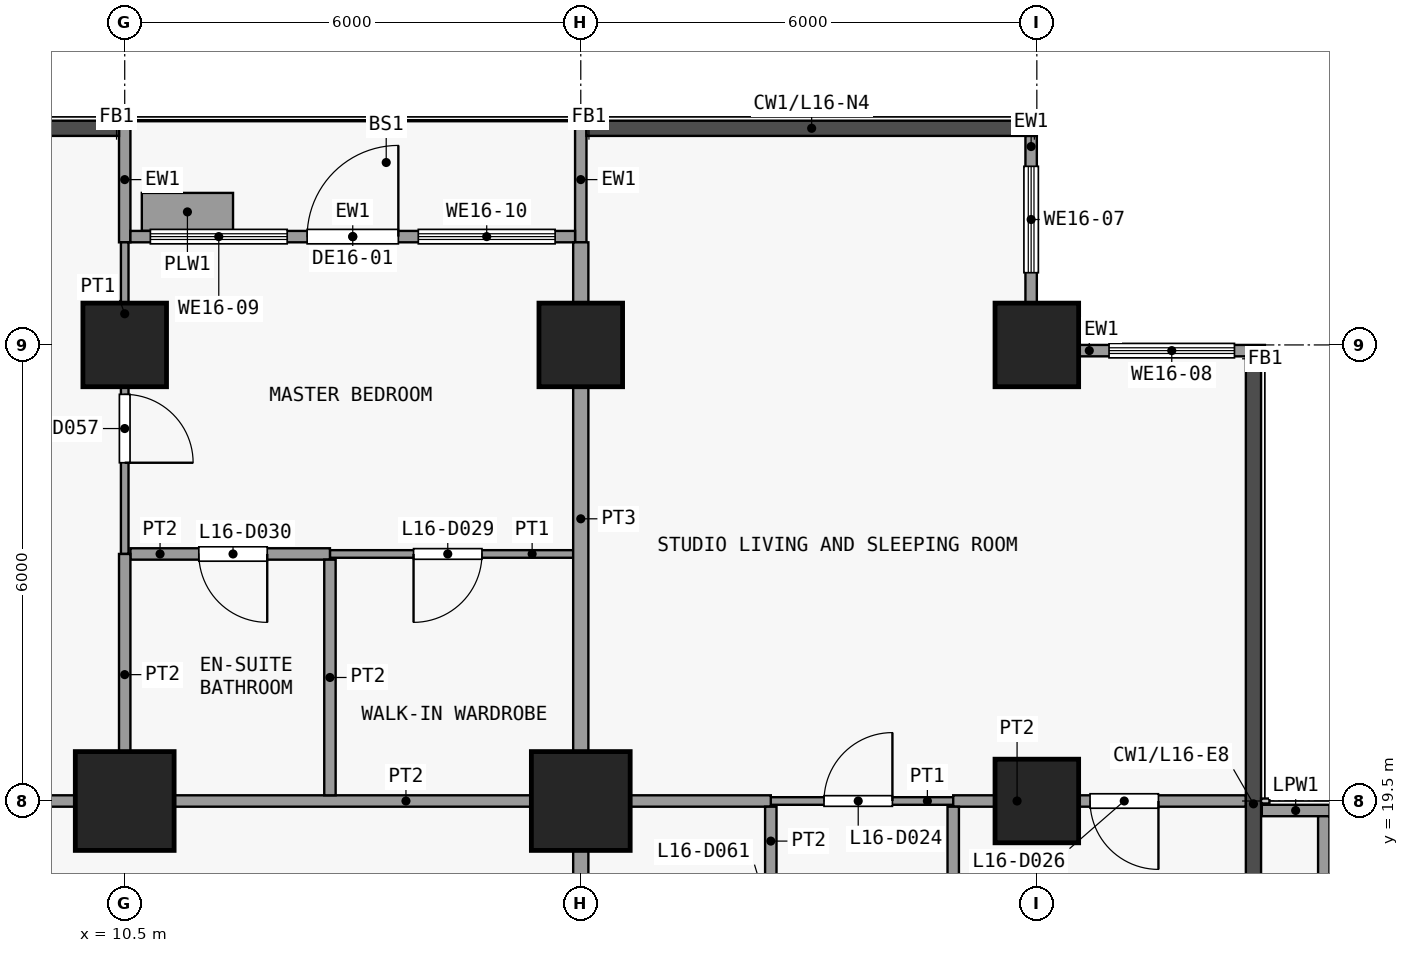
"""IFC4 building model, lengths in metres.
Left out: names, types, materials, properties, quantities, classifications, styles, units other than length and angle.
Written with IfcOpenShell. Run it as: python <this file> out.ifc"""

import sys

from ifc_helpers import new_model, si_unit, direction, frame, frame_2d, origin, origin_2d, place, context, subcontext, project, spatial, rectangle, extrude, element, fill, save


model = new_model("IFC4")
c1 = context("Model", 3, precision=1e-05, world=origin(), true_north=direction((0.0, 1.0)))
c2 = subcontext(c1, "Body", "Model", "MODEL_VIEW")
j1 = project(units=[si_unit("LENGTHUNIT", "METRE"), si_unit("PLANEANGLEUNIT", "RADIAN")], contexts=[c1])
p1 = place(None, origin())
s1 = spatial("IfcSite", under=j1, at=p1, CompositionType="ELEMENT")
p2 = place(p1, origin())
s2 = spatial("IfcBuilding", under=s1, at=p2, CompositionType="ELEMENT")
p3 = place(p2, frame((0.0, 0.0, 68.5)))
s3 = spatial("IfcBuildingStorey", under=s2, at=p3, CompositionType="ELEMENT", Elevation=68.5)
p4 = place(p3, frame((10.5, 19.5, 0.0), z_axis=(0.0, 0.0, 1.0), x_axis=(1.0, 0.0, 0.0)))
e1 = element("IfcColumn", 1, at=p4, inside=s3, PredefinedType="COLUMN", context=c2, shape_type="SweptSolid", body=[
    extrude(rectangle(XDim=1.3, YDim=1.3, at=origin_2d()), origin(), (0.0, 0.0, 1.0), 3.6),
])
p5 = place(p3, frame((10.5, 25.5, 0.0), z_axis=(0.0, 0.0, 1.0), x_axis=(1.0, 0.0, 0.0)))
e2 = element("IfcColumn", 2, at=p5, inside=s3, PredefinedType="COLUMN", context=c2, shape_type="SweptSolid", body=[
    extrude(rectangle(XDim=1.1, YDim=1.1, at=origin_2d()), origin(), (0.0, 0.0, 1.0), 3.6),
])
p6 = place(p3, frame((16.5, 19.5, 0.0), z_axis=(0.0, 0.0, 1.0), x_axis=(1.0, 0.0, 0.0)))
e3 = element("IfcColumn", 3, at=p6, inside=s3, PredefinedType="COLUMN", context=c2, shape_type="SweptSolid", body=[
    extrude(rectangle(XDim=1.3, YDim=1.3, at=origin_2d()), origin(), (0.0, 0.0, 1.0), 3.6),
])
for number, where, z_axis, x_axis in (
    (4, (16.5, 25.5, 0.0), (0.0, 0.0, 1.0), (1.0, 0.0, 0.0)),
    (5, (22.5, 19.5, 0.0), (0.0, 0.0, 1.0), (1.0, 0.0, 0.0)),
    (6, (22.5, 25.5, 0.0), (0.0, 0.0, 1.0), (1.0, 0.0, 0.0)),
):
    element("IfcColumn", number, at=place(p3, frame(where, z_axis=z_axis, x_axis=x_axis)), inside=s3, PredefinedType="COLUMN", context=c2, shape_type="SweptSolid", body=[
        extrude(rectangle(XDim=1.1, YDim=1.1, at=origin_2d()), origin(), (0.0, 0.0, 1.0), 3.6),
    ])
p7 = place(p3, frame((22.425, 28.25, 0.0), z_axis=(0.0, 0.0, 1.0), x_axis=(0.0, -1.0, 0.0)))
e7 = element("IfcWall", 7, at=p7, inside=s3, PredefinedType="SOLIDWALL", context=c2, shape_type="SweptSolid", body=[
    extrude(rectangle(XDim=2.2, YDim=0.15, at=frame_2d((1.1, 0.0))), origin(), (0.0, 0.0, 1.0), 3.3),
])
p8 = place(p7, frame((0.4, 0.0, 0.9)))
e8 = element("IfcOpeningElement", 8, at=p8, cuts=e7, PredefinedType="OPENING", context=c2, shape_type="SweptSolid", body=[
    extrude(rectangle(XDim=1.4, YDim=2.4, at=frame_2d((0.7, 1.2))), frame((0.0, 0.085, 0.0), z_axis=(0.0, -1.0, 0.0), x_axis=(1.0, 0.0, 0.0)), (0.0, 0.0, 1.0), 0.17),
])
p9 = place(p3, frame((23.05, 25.425, 0.0), z_axis=(0.0, 0.0, 1.0), x_axis=(1.0, 0.0, 0.0)))
e9 = element("IfcWall", 9, at=p9, inside=s3, PredefinedType="SOLIDWALL", context=c2, shape_type="SweptSolid", body=[
    extrude(rectangle(XDim=2.45, YDim=0.15, at=frame_2d((1.225, 0.0))), origin(), (0.0, 0.0, 1.0), 3.3),
])
p10 = place(p9, frame((0.4, 0.0, 0.9)))
e10 = element("IfcOpeningElement", 10, at=p10, cuts=e9, PredefinedType="OPENING", context=c2, shape_type="SweptSolid", body=[
    extrude(rectangle(XDim=1.65, YDim=2.4, at=frame_2d((0.825, 1.2))), frame((0.0, 0.085, 0.0), z_axis=(0.0, -1.0, 0.0), x_axis=(1.0, 0.0, 0.0)), (0.0, 0.0, 1.0), 0.17),
])
for number, where, z_axis, x_axis in (
    (11, (10.5, 26.85, 0.0), (0.0, 0.0, 1.0), (0.0, 1.0, 0.0)),
    (12, (16.5, 26.85, 0.0), (0.0, 0.0, 1.0), (0.0, 1.0, 0.0)),
):
    element("IfcWall", number, at=place(p3, frame(where, z_axis=z_axis, x_axis=x_axis)), inside=s3, PredefinedType="SOLIDWALL", context=c2, shape_type="SweptSolid", body=[
        extrude(rectangle(XDim=1.65, YDim=0.15, at=frame_2d((0.825, 0.0))), origin(), (0.0, 0.0, 1.0), 3.3),
    ])
p11 = place(p3, frame((10.575, 26.925, 0.0), z_axis=(0.0, 0.0, 1.0), x_axis=(1.0, 0.0, 0.0)))
e13 = element("IfcWall", 13, at=p11, inside=s3, PredefinedType="SOLIDWALL", context=c2, shape_type="SweptSolid", body=[
    extrude(rectangle(XDim=5.85, YDim=0.15, at=frame_2d((2.925, 0.0))), origin(), (0.0, 0.0, 1.0), 3.3),
])
p12 = place(p11, frame((2.325, 0.0, 0.0)))
e14 = element("IfcOpeningElement", 14, at=p12, cuts=e13, PredefinedType="OPENING", context=c2, shape_type="SweptSolid", body=[
    extrude(rectangle(XDim=1.2, YDim=2.4, at=frame_2d((0.6, 1.2))), frame((0.0, 0.085, 0.0), z_axis=(0.0, -1.0, 0.0), x_axis=(1.0, 0.0, 0.0)), (0.0, 0.0, 1.0), 0.17),
])
p13 = place(p11, frame((0.262, 0.0, 0.9)))
e15 = element("IfcOpeningElement", 15, at=p13, cuts=e13, PredefinedType="OPENING", context=c2, shape_type="SweptSolid", body=[
    extrude(rectangle(XDim=1.8, YDim=2.1, at=frame_2d((0.9, 1.05))), frame((0.0, 0.085, 0.0), z_axis=(0.0, -1.0, 0.0), x_axis=(1.0, 0.0, 0.0)), (0.0, 0.0, 1.0), 0.17),
])
p14 = place(p11, frame((3.788, 0.0, 0.9)))
e16 = element("IfcOpeningElement", 16, at=p14, cuts=e13, PredefinedType="OPENING", context=c2, shape_type="SweptSolid", body=[
    extrude(rectangle(XDim=1.8, YDim=2.1, at=frame_2d((0.9, 1.05))), frame((0.0, 0.085, 0.0), z_axis=(0.0, -1.0, 0.0), x_axis=(1.0, 0.0, 0.0)), (0.0, 0.0, 1.0), 0.17),
])
p15 = place(p3, frame((10.725, 27.25, 0.0), z_axis=(0.0, 0.0, 1.0), x_axis=(1.0, 0.0, 0.0)))
e17 = element("IfcWall", 17, at=p15, inside=s3, PredefinedType="USERDEFINED", context=c2, shape_type="SweptSolid", body=[
    extrude(rectangle(XDim=1.2, YDim=0.5, at=frame_2d((0.6, 0.0))), origin(), (0.0, 0.0, 1.0), 0.9),
])
p16 = place(p3, frame((25.46, 19.375, 0.0), z_axis=(0.0, 0.0, 1.0), x_axis=(1.0, 0.0, 0.0)))
e18 = element("IfcWall", 18, at=p16, inside=s3, PredefinedType="PARAPET", context=c2, shape_type="SweptSolid", body=[
    extrude(rectangle(XDim=0.89, YDim=0.15, at=frame_2d((0.445, 0.0))), origin(), (0.0, 0.0, 1.0), 1.15),
])
p17 = place(p3, frame((26.275, 19.3, 0.0), z_axis=(0.0, 0.0, 1.0), x_axis=(0.0, -1.0, 0.0)))
e19 = element("IfcWall", 19, at=p17, inside=s3, PredefinedType="PARAPET", context=c2, shape_type="SweptSolid", body=[
    extrude(rectangle(XDim=5.75, YDim=0.15, at=frame_2d((2.875, 0.0))), origin(), (0.0, 0.0, 1.0), 1.15),
])
p18 = place(p3, frame((19.0, 19.5, 0.0), z_axis=(0.0, 0.0, 1.0), x_axis=(1.0, 0.0, 0.0)))
e20 = element("IfcWall", 20, at=p18, inside=s3, PredefinedType="PARTITIONING", context=c2, shape_type="SweptSolid", body=[
    extrude(rectangle(XDim=2.4, YDim=0.1, at=frame_2d((1.2, 0.0))), origin(), (0.0, 0.0, 1.0), 3.3),
])
p19 = place(p18, frame((0.7, 0.0, 0.0)))
e21 = element("IfcOpeningElement", 21, at=p19, cuts=e20, PredefinedType="OPENING", context=c2, shape_type="SweptSolid", body=[
    extrude(rectangle(XDim=0.9, YDim=2.1, at=frame_2d((0.45, 1.05))), frame((0.0, 0.06, 0.0), z_axis=(0.0, -1.0, 0.0), x_axis=(1.0, 0.0, 0.0)), (0.0, 0.0, 1.0), 0.12),
])
p20 = place(p3, frame((9.4, 19.5, 0.0), z_axis=(0.0, 0.0, 1.0), x_axis=(1.0, 0.0, 0.0)))
e22 = element("IfcWall", 22, at=p20, inside=s3, PredefinedType="PARTITIONING", context=c2, shape_type="SweptSolid", body=[
    extrude(rectangle(XDim=9.6, YDim=0.15, at=frame_2d((4.8, 0.0))), origin(), (0.0, 0.0, 1.0), 3.3),
])
p21 = place(p3, frame((21.4, 19.5, 0.0), z_axis=(0.0, 0.0, 1.0), x_axis=(1.0, 0.0, 0.0)))
e23 = element("IfcWall", 23, at=p21, inside=s3, PredefinedType="PARTITIONING", context=c2, shape_type="SweptSolid", body=[
    extrude(rectangle(XDim=3.85, YDim=0.15, at=frame_2d((1.925, 0.0))), origin(), (0.0, 0.0, 1.0), 3.3),
])
p22 = place(p21, frame((1.8, 0.0, 0.0)))
e24 = element("IfcOpeningElement", 24, at=p22, cuts=e23, PredefinedType="OPENING", context=c2, shape_type="SweptSolid", body=[
    extrude(rectangle(XDim=0.9, YDim=2.1, at=frame_2d((0.45, 1.05))), frame((0.0, 0.085, 0.0), z_axis=(0.0, -1.0, 0.0), x_axis=(1.0, 0.0, 0.0)), (0.0, 0.0, 1.0), 0.17),
])
p23 = place(p3, frame((13.2, 22.75, 0.0), z_axis=(0.0, 0.0, 1.0), x_axis=(1.0, 0.0, 0.0)))
e25 = element("IfcWall", 25, at=p23, inside=s3, PredefinedType="PARTITIONING", context=c2, shape_type="SweptSolid", body=[
    extrude(rectangle(XDim=3.2, YDim=0.1, at=frame_2d((1.6, 0.0))), origin(), (0.0, 0.0, 1.0), 3.3),
])
p24 = place(p23, frame((1.1, 0.0, 0.0)))
e26 = element("IfcOpeningElement", 26, at=p24, cuts=e25, PredefinedType="OPENING", context=c2, shape_type="SweptSolid", body=[
    extrude(rectangle(XDim=0.9, YDim=2.1, at=frame_2d((0.45, 1.05))), frame((0.0, 0.06, 0.0), z_axis=(0.0, -1.0, 0.0), x_axis=(1.0, 0.0, 0.0)), (0.0, 0.0, 1.0), 0.12),
])
p25 = place(p3, frame((10.575, 22.75, 0.0), z_axis=(0.0, 0.0, 1.0), x_axis=(1.0, 0.0, 0.0)))
e27 = element("IfcWall", 27, at=p25, inside=s3, PredefinedType="PARTITIONING", context=c2, shape_type="SweptSolid", body=[
    extrude(rectangle(XDim=2.625, YDim=0.15, at=frame_2d((1.312, 0.0))), origin(), (0.0, 0.0, 1.0), 3.3),
])
p26 = place(p25, frame((0.9, 0.0, 0.0)))
e28 = element("IfcOpeningElement", 28, at=p26, cuts=e27, PredefinedType="OPENING", context=c2, shape_type="SweptSolid", body=[
    extrude(rectangle(XDim=0.9, YDim=2.1, at=frame_2d((0.45, 1.05))), frame((0.0, 0.085, 0.0), z_axis=(0.0, -1.0, 0.0), x_axis=(1.0, 0.0, 0.0)), (0.0, 0.0, 1.0), 0.17),
])
p27 = place(p3, frame((10.5, 22.75, 0.0), z_axis=(0.0, 0.0, 1.0), x_axis=(0.0, 1.0, 0.0)))
e29 = element("IfcWall", 29, at=p27, inside=s3, PredefinedType="PARTITIONING", context=c2, shape_type="SweptSolid", body=[
    extrude(rectangle(XDim=4.1, YDim=0.1, at=frame_2d((2.05, 0.0))), origin(), (0.0, 0.0, 1.0), 3.3),
])
p28 = place(p27, frame((1.2, 0.0, 0.0)))
e30 = element("IfcOpeningElement", 30, at=p28, cuts=e29, PredefinedType="OPENING", context=c2, shape_type="SweptSolid", body=[
    extrude(rectangle(XDim=0.9, YDim=2.1, at=frame_2d((0.45, 1.05))), frame((0.0, 0.06, 0.0), z_axis=(0.0, -1.0, 0.0), x_axis=(1.0, 0.0, 0.0)), (0.0, 0.0, 1.0), 0.12),
])
p29 = place(p3, frame((10.5, 19.575, 0.0), z_axis=(0.0, 0.0, 1.0), x_axis=(0.0, 1.0, 0.0)))
e31 = element("IfcWall", 31, at=p29, inside=s3, PredefinedType="PARTITIONING", context=c2, shape_type="SweptSolid", body=[
    extrude(rectangle(XDim=3.175, YDim=0.15, at=frame_2d((1.587, 0.0))), origin(), (0.0, 0.0, 1.0), 3.3),
])
p30 = place(p3, frame((13.2, 19.575, 0.0), z_axis=(0.0, 0.0, 1.0), x_axis=(0.0, 1.0, 0.0)))
e32 = element("IfcWall", 32, at=p30, inside=s3, PredefinedType="PARTITIONING", context=c2, shape_type="SweptSolid", body=[
    extrude(rectangle(XDim=3.1, YDim=0.15, at=frame_2d((1.55, 0.0))), origin(), (0.0, 0.0, 1.0), 3.3),
])
p31 = place(p3, frame((16.5, 16.6, 0.0), z_axis=(0.0, 0.0, 1.0), x_axis=(0.0, 1.0, 0.0)))
e33 = element("IfcWall", 33, at=p31, inside=s3, PredefinedType="PARTITIONING", context=c2, shape_type="SweptSolid", body=[
    extrude(rectangle(XDim=2.825, YDim=0.2, at=frame_2d((1.413, 0.0))), origin(), (0.0, 0.0, 1.0), 3.3),
])
p32 = place(p3, frame((16.5, 19.575, 0.0), z_axis=(0.0, 0.0, 1.0), x_axis=(0.0, 1.0, 0.0)))
e34 = element("IfcWall", 34, at=p32, inside=s3, PredefinedType="PARTITIONING", context=c2, shape_type="SweptSolid", body=[
    extrude(rectangle(XDim=7.275, YDim=0.2, at=frame_2d((3.638, 0.0))), origin(), (0.0, 0.0, 1.0), 3.3),
])
p33 = place(p3, frame((19.0, 16.6, 0.0), z_axis=(0.0, 0.0, 1.0), x_axis=(0.0, 1.0, 0.0)))
e35 = element("IfcWall", 35, at=p33, inside=s3, PredefinedType="PARTITIONING", context=c2, shape_type="SweptSolid", body=[
    extrude(rectangle(XDim=2.825, YDim=0.15, at=frame_2d((1.413, 0.0))), origin(), (0.0, 0.0, 1.0), 3.3),
])
p34 = place(p33, frame((0.9, 0.0, 0.0)))
e36 = element("IfcOpeningElement", 36, at=p34, cuts=e35, PredefinedType="OPENING", context=c2, shape_type="SweptSolid", body=[
    extrude(rectangle(XDim=0.9, YDim=2.1, at=frame_2d((0.45, 1.05))), frame((0.0, 0.085, 0.0), z_axis=(0.0, -1.0, 0.0), x_axis=(1.0, 0.0, 0.0)), (0.0, 0.0, 1.0), 0.17),
])
p35 = place(p3, frame((21.4, 16.6, 0.0), z_axis=(0.0, 0.0, 1.0), x_axis=(0.0, 1.0, 0.0)))
e37 = element("IfcWall", 37, at=p35, inside=s3, PredefinedType="PARTITIONING", context=c2, shape_type="SweptSolid", body=[
    extrude(rectangle(XDim=2.825, YDim=0.15, at=frame_2d((1.413, 0.0))), origin(), (0.0, 0.0, 1.0), 3.3),
])
p36 = place(p8, origin())
e38 = element("IfcWindow", 38, at=p36, inside=s3, PartitioningType="SINGLE_PANEL", PredefinedType="WINDOW", context=c2, shape_type="SweptSolid", body=[
    extrude(rectangle(XDim=1.4, YDim=2.4, at=frame_2d((0.7, 1.2))), frame((0.0, 0.03, 0.0), z_axis=(0.0, -1.0, 0.0), x_axis=(1.0, 0.0, 0.0)), (0.0, 0.0, 1.0), 0.06),
])
fill(e8, e38)
p37 = place(p10, origin())
e39 = element("IfcWindow", 39, at=p37, inside=s3, PartitioningType="SINGLE_PANEL", PredefinedType="WINDOW", context=c2, shape_type="SweptSolid", body=[
    extrude(rectangle(XDim=1.65, YDim=2.4, at=frame_2d((0.825, 1.2))), frame((0.0, 0.03, 0.0), z_axis=(0.0, -1.0, 0.0), x_axis=(1.0, 0.0, 0.0)), (0.0, 0.0, 1.0), 0.06),
])
fill(e10, e39)
p38 = place(p12, origin())
e40 = element("IfcDoor", 40, at=p38, inside=s3, OperationType="SINGLE_SWING_RIGHT", PredefinedType="DOOR", context=c2, shape_type="SweptSolid", body=[
    extrude(rectangle(XDim=1.2, YDim=2.4, at=frame_2d((0.6, 1.2))), frame((0.0, 0.025, 0.0), z_axis=(0.0, -1.0, 0.0), x_axis=(1.0, 0.0, 0.0)), (0.0, 0.0, 1.0), 0.05),
])
fill(e14, e40)
p39 = place(p13, origin())
e41 = element("IfcWindow", 41, at=p39, inside=s3, PartitioningType="SINGLE_PANEL", PredefinedType="WINDOW", context=c2, shape_type="SweptSolid", body=[
    extrude(rectangle(XDim=1.8, YDim=2.1, at=frame_2d((0.9, 1.05))), frame((0.0, 0.03, 0.0), z_axis=(0.0, -1.0, 0.0), x_axis=(1.0, 0.0, 0.0)), (0.0, 0.0, 1.0), 0.06),
])
fill(e15, e41)
p40 = place(p14, origin())
e42 = element("IfcWindow", 42, at=p40, inside=s3, PartitioningType="SINGLE_PANEL", PredefinedType="WINDOW", context=c2, shape_type="SweptSolid", body=[
    extrude(rectangle(XDim=1.8, YDim=2.1, at=frame_2d((0.9, 1.05))), frame((0.0, 0.03, 0.0), z_axis=(0.0, -1.0, 0.0), x_axis=(1.0, 0.0, 0.0)), (0.0, 0.0, 1.0), 0.06),
])
fill(e16, e42)
p41 = place(p19, origin())
e43 = element("IfcDoor", 43, at=p41, inside=s3, OperationType="SINGLE_SWING_LEFT", PredefinedType="DOOR", context=c2, shape_type="SweptSolid", body=[
    extrude(rectangle(XDim=0.9, YDim=2.1, at=frame_2d((0.45, 1.05))), frame((0.0, 0.025, 0.0), z_axis=(0.0, -1.0, 0.0), x_axis=(1.0, 0.0, 0.0)), (0.0, 0.0, 1.0), 0.05),
])
fill(e21, e43)
p42 = place(p22, origin())
e44 = element("IfcDoor", 44, at=p42, inside=s3, OperationType="SINGLE_SWING_RIGHT", PredefinedType="DOOR", context=c2, shape_type="SweptSolid", body=[
    extrude(rectangle(XDim=0.9, YDim=2.1, at=frame_2d((0.45, 1.05))), frame((0.0, 0.025, 0.0), z_axis=(0.0, -1.0, 0.0), x_axis=(1.0, 0.0, 0.0)), (0.0, 0.0, 1.0), 0.05),
])
fill(e24, e44)
p43 = place(p24, origin())
e45 = element("IfcDoor", 45, at=p43, inside=s3, OperationType="SINGLE_SWING_LEFT", PredefinedType="DOOR", context=c2, shape_type="SweptSolid", body=[
    extrude(rectangle(XDim=0.9, YDim=2.1, at=frame_2d((0.45, 1.05))), frame((0.0, 0.025, 0.0), z_axis=(0.0, -1.0, 0.0), x_axis=(1.0, 0.0, 0.0)), (0.0, 0.0, 1.0), 0.05),
])
fill(e26, e45)
p44 = place(p26, origin())
e46 = element("IfcDoor", 46, at=p44, inside=s3, OperationType="SINGLE_SWING_RIGHT", PredefinedType="DOOR", context=c2, shape_type="SweptSolid", body=[
    extrude(rectangle(XDim=0.9, YDim=2.1, at=frame_2d((0.45, 1.05))), frame((0.0, 0.025, 0.0), z_axis=(0.0, -1.0, 0.0), x_axis=(1.0, 0.0, 0.0)), (0.0, 0.0, 1.0), 0.05),
])
fill(e28, e46)
p45 = place(p28, origin())
e47 = element("IfcDoor", 47, at=p45, inside=s3, OperationType="SINGLE_SWING_LEFT", PredefinedType="DOOR", context=c2, shape_type="SweptSolid", body=[
    extrude(rectangle(XDim=0.9, YDim=2.1, at=frame_2d((0.45, 1.05))), frame((0.0, 0.025, 0.0), z_axis=(0.0, -1.0, 0.0), x_axis=(1.0, 0.0, 0.0)), (0.0, 0.0, 1.0), 0.05),
])
fill(e30, e47)
save(model, sys.argv[1])
